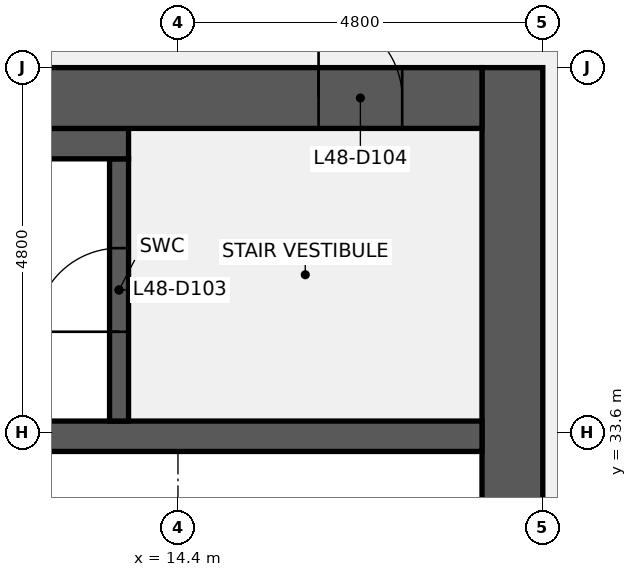
"""IFC4 building model, lengths in metres.
Left out: names, types, materials, properties, quantities, classifications, styles, units other than length and angle.
Written with IfcOpenShell. Run it as: python <this file> out.ifc"""

import sys

from ifc_helpers import new_model, si_unit, direction, frame, frame_2d, origin, place, context, subcontext, project, spatial, rectangle, extrude, element, fill, save


model = new_model("IFC4")
c1 = context("Model", 3, precision=1e-05, world=origin(), true_north=direction((0.0, 1.0)))
c2 = subcontext(c1, "Body", "Model", "MODEL_VIEW")
j1 = project(units=[si_unit("LENGTHUNIT", "METRE"), si_unit("PLANEANGLEUNIT", "RADIAN")], contexts=[c1])
p1 = place(None, origin())
s1 = spatial("IfcSite", under=j1, at=p1, CompositionType="ELEMENT")
p2 = place(p1, origin())
s2 = spatial("IfcBuilding", under=s1, at=p2, CompositionType="ELEMENT")
p3 = place(p2, frame((0.0, 0.0, 221.2)))
s3 = spatial("IfcBuildingStorey", under=s2, at=p3, CompositionType="ELEMENT", Elevation=221.2)
p4 = place(p3, frame((18.8, 38.4, 0.0), z_axis=(0.0, 0.0, 1.0), x_axis=(0.0, -1.0, 0.0)))
e1 = element("IfcWall", 1, at=p4, inside=s3, PredefinedType="SHEAR", context=c2, shape_type="SweptSolid", body=[
    extrude(rectangle(XDim=28.8, YDim=0.8, at=frame_2d((14.4, 0.0))), origin(), (0.0, 0.0, 1.0), 3.84),
])
p5 = place(p4, frame((18.3, 0.0, 0.0)))
e2 = element("IfcOpeningElement", 2, at=p5, cuts=e1, PredefinedType="OPENING", context=c2, shape_type="SweptSolid", body=[
    extrude(rectangle(XDim=1.8, YDim=2.1, at=frame_2d((0.9, 1.05))), frame((0.0, 0.41, 0.0), z_axis=(0.0, -1.0, 0.0), x_axis=(1.0, 0.0, 0.0)), (0.0, 0.0, 1.0), 0.82),
])
p6 = place(p4, frame((8.7, 0.0, 0.0)))
e3 = element("IfcOpeningElement", 3, at=p6, cuts=e1, PredefinedType="OPENING", context=c2, shape_type="SweptSolid", body=[
    extrude(rectangle(XDim=1.8, YDim=2.1, at=frame_2d((0.9, 1.05))), frame((0.0, 0.41, 0.0), z_axis=(0.0, -1.0, 0.0), x_axis=(1.0, 0.0, 0.0)), (0.0, 0.0, 1.0), 0.82),
])
p7 = place(p3, frame((0.8, 33.55, 0.0), z_axis=(0.0, 0.0, 1.0), x_axis=(1.0, 0.0, 0.0)))
e4 = element("IfcWall", 4, at=p7, inside=s3, PredefinedType="SHEAR", context=c2, shape_type="SweptSolid", body=[
    extrude(rectangle(XDim=17.6, YDim=0.4, at=frame_2d((8.8, 0.0))), origin(), (0.0, 0.0, 1.0), 3.84),
])
p8 = place(p3, frame((13.625, 33.75, 0.0), z_axis=(0.0, 0.0, 1.0), x_axis=(0.0, 1.0, 0.0)))
e5 = element("IfcWall", 5, at=p8, inside=s3, PredefinedType="SHEAR", context=c2, shape_type="SweptSolid", body=[
    extrude(rectangle(XDim=3.45, YDim=0.25, at=frame_2d((1.725, 0.0))), origin(), (0.0, 0.0, 1.0), 3.84),
])
p9 = place(p8, frame((1.175, 0.0, 0.0)))
e6 = element("IfcOpeningElement", 6, at=p9, cuts=e5, PredefinedType="OPENING", context=c2, shape_type="SweptSolid", body=[
    extrude(rectangle(XDim=1.1, YDim=2.1, at=frame_2d((0.55, 1.05))), frame((0.0, 0.135, 0.0), z_axis=(0.0, -1.0, 0.0), x_axis=(1.0, 0.0, 0.0)), (0.0, 0.0, 1.0), 0.27),
])
p10 = place(p3, frame((9.6, 37.4, 0.0), z_axis=(0.0, 0.0, 1.0), x_axis=(1.0, 0.0, 0.0)))
e7 = element("IfcWall", 7, at=p10, inside=s3, PredefinedType="SHEAR", context=c2, shape_type="SweptSolid", body=[
    extrude(rectangle(XDim=4.15, YDim=0.4, at=frame_2d((2.075, 0.0))), origin(), (0.0, 0.0, 1.0), 3.84),
])
p11 = place(p3, frame((9.6, 38.0, 0.0), z_axis=(0.0, 0.0, 1.0), x_axis=(1.0, 0.0, 0.0)))
e8 = element("IfcWall", 8, at=p11, inside=s3, PredefinedType="SHEAR", context=c2, shape_type="SweptSolid", body=[
    extrude(rectangle(XDim=8.8, YDim=0.8, at=frame_2d((4.4, 0.0))), origin(), (0.0, 0.0, 1.0), 3.84),
])
p12 = place(p11, frame((6.65, 0.0, 0.0)))
e9 = element("IfcOpeningElement", 9, at=p12, cuts=e8, PredefinedType="OPENING", context=c2, shape_type="SweptSolid", body=[
    extrude(rectangle(XDim=1.1, YDim=2.1, at=frame_2d((0.55, 1.05))), frame((0.0, 0.41, 0.0), z_axis=(0.0, -1.0, 0.0), x_axis=(1.0, 0.0, 0.0)), (0.0, 0.0, 1.0), 0.82),
])
p13 = place(p9, origin())
e10 = element("IfcDoor", 10, at=p13, inside=s3, OperationType="SINGLE_SWING_LEFT", PredefinedType="DOOR", context=c2, shape_type="SweptSolid", body=[
    extrude(rectangle(XDim=1.1, YDim=2.1, at=frame_2d((0.55, 1.05))), frame((0.0, 0.025, 0.0), z_axis=(0.0, -1.0, 0.0), x_axis=(1.0, 0.0, 0.0)), (0.0, 0.0, 1.0), 0.05),
])
fill(e6, e10)
p14 = place(p12, origin())
e11 = element("IfcDoor", 11, at=p14, inside=s3, OperationType="SINGLE_SWING_LEFT", PredefinedType="DOOR", context=c2, shape_type="SweptSolid", body=[
    extrude(rectangle(XDim=1.1, YDim=2.1, at=frame_2d((0.55, 1.05))), frame((0.0, 0.025, 0.0), z_axis=(0.0, -1.0, 0.0), x_axis=(1.0, 0.0, 0.0)), (0.0, 0.0, 1.0), 0.05),
])
fill(e9, e11)
save(model, sys.argv[1])
